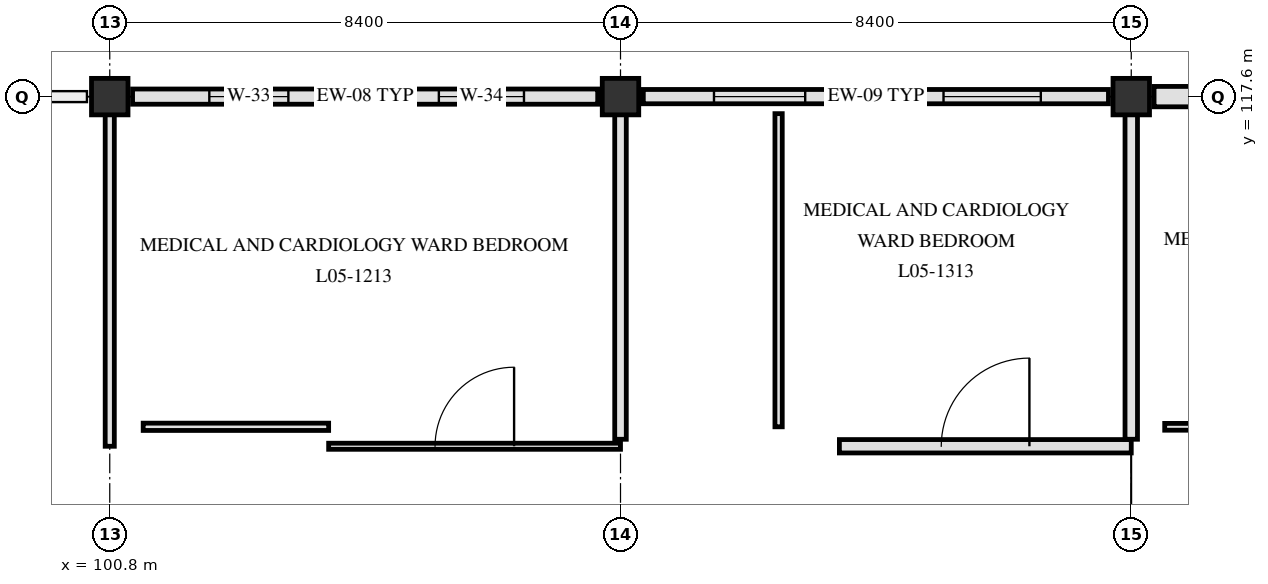
"""IFC4 building model, lengths in metres.
Left out: names, types, materials, properties, quantities, classifications, styles, units other than length and angle.
Written with IfcOpenShell. Run it as: python <this file> out.ifc"""

import sys

from ifc_helpers import new_model, si_unit, direction, frame, frame_2d, origin, origin_2d, place, context, subcontext, project, spatial, rectangle, extrude, element, fill, save


model = new_model("IFC4")
c1 = context("Model", 3, precision=1e-05, world=origin(), true_north=direction((0.0, 1.0)))
c2 = subcontext(c1, "Body", "Model", "MODEL_VIEW")
j1 = project(units=[si_unit("LENGTHUNIT", "METRE"), si_unit("PLANEANGLEUNIT", "RADIAN")], contexts=[c1])
p1 = place(None, origin())
s1 = spatial("IfcSite", under=j1, at=p1, CompositionType="ELEMENT")
p2 = place(p1, origin())
s2 = spatial("IfcBuilding", under=s1, at=p2, CompositionType="ELEMENT")
p3 = place(p2, frame((0.0, 0.0, 22.5)))
s3 = spatial("IfcBuildingStorey", under=s2, at=p3, CompositionType="ELEMENT", Elevation=22.5)
for number, where, z_axis, x_axis in (
    (1, (100.8, 117.6, 0.0), (0.0, 0.0, 1.0), (1.0, 0.0, 0.0)),
    (2, (109.2, 117.6, 0.0), (0.0, 0.0, 1.0), (1.0, 0.0, 0.0)),
    (3, (117.6, 117.6, 0.0), (0.0, 0.0, 1.0), (1.0, 0.0, 0.0)),
):
    element("IfcColumn", number, at=place(p3, frame(where, z_axis=z_axis, x_axis=x_axis)), inside=s3, PredefinedType="COLUMN", context=c2, shape_type="SweptSolid", body=[
        extrude(rectangle(XDim=0.6, YDim=0.6, at=origin_2d()), origin(), (0.0, 0.0, 1.0), 3.9),
    ])
p4 = place(p3, frame((101.175, 117.6, 0.0), z_axis=(0.0, 0.0, 1.0), x_axis=(1.0, 0.0, 0.0)))
e4 = element("IfcWall", 4, at=p4, inside=s3, PredefinedType="SOLIDWALL", context=c2, shape_type="SweptSolid", body=[
    extrude(rectangle(XDim=7.65, YDim=0.25, at=frame_2d((3.825, 0.0))), origin(), (0.0, 0.0, 1.0), 3.31),
])
p5 = place(p4, frame((1.262, 0.0, 0.85)))
e5 = element("IfcOpeningElement", 5, at=p5, cuts=e4, PredefinedType="OPENING", context=c2, shape_type="SweptSolid", body=[
    extrude(rectangle(XDim=1.3, YDim=1.66, at=frame_2d((0.65, 0.83))), frame((0.0, 0.135, 0.0), z_axis=(0.0, -1.0, 0.0), x_axis=(1.0, 0.0, 0.0)), (0.0, 0.0, 1.0), 0.27),
])
p6 = place(p4, frame((5.038, 0.0, 0.85)))
e6 = element("IfcOpeningElement", 6, at=p6, cuts=e4, PredefinedType="OPENING", context=c2, shape_type="SweptSolid", body=[
    extrude(rectangle(XDim=1.4, YDim=1.66, at=frame_2d((0.7, 0.83))), frame((0.0, 0.135, 0.0), z_axis=(0.0, -1.0, 0.0), x_axis=(1.0, 0.0, 0.0)), (0.0, 0.0, 1.0), 0.27),
])
p7 = place(p3, frame((109.575, 117.6, 0.0), z_axis=(0.0, 0.0, 1.0), x_axis=(1.0, 0.0, 0.0)))
e7 = element("IfcWall", 7, at=p7, inside=s3, PredefinedType="SOLIDWALL", context=c2, shape_type="SweptSolid", body=[
    extrude(rectangle(XDim=7.65, YDim=0.235, at=frame_2d((3.825, 0.0))), origin(), (0.0, 0.0, 1.0), 3.31),
])
p8 = place(p7, frame((1.163, 0.0, 0.85)))
e8 = element("IfcOpeningElement", 8, at=p8, cuts=e7, PredefinedType="OPENING", context=c2, shape_type="SweptSolid", body=[
    extrude(rectangle(XDim=1.5, YDim=1.66, at=frame_2d((0.75, 0.83))), frame((0.0, 0.127, 0.0), z_axis=(0.0, -1.0, 0.0), x_axis=(1.0, 0.0, 0.0)), (0.0, 0.0, 1.0), 0.255),
])
p9 = place(p7, frame((4.938, 0.0, 0.85)))
e9 = element("IfcOpeningElement", 9, at=p9, cuts=e7, PredefinedType="OPENING", context=c2, shape_type="SweptSolid", body=[
    extrude(rectangle(XDim=1.6, YDim=1.66, at=frame_2d((0.8, 0.83))), frame((0.0, 0.127, 0.0), z_axis=(0.0, -1.0, 0.0), x_axis=(1.0, 0.0, 0.0)), (0.0, 0.0, 1.0), 0.255),
])
p10 = place(p3, frame((117.975, 117.6, 0.0), z_axis=(0.0, 0.0, 1.0), x_axis=(1.0, 0.0, 0.0)))
e10 = element("IfcWall", 10, at=p10, inside=s3, PredefinedType="SOLIDWALL", context=c2, shape_type="SweptSolid", body=[
    extrude(rectangle(XDim=7.65, YDim=0.335, at=frame_2d((3.825, 0.0))), origin(), (0.0, 0.0, 1.0), 3.31),
])
p11 = place(p10, frame((1.062, 0.0, 0.85)))
e11 = element("IfcOpeningElement", 11, at=p11, cuts=e10, PredefinedType="OPENING", context=c2, shape_type="SweptSolid", body=[
    extrude(rectangle(XDim=1.7, YDim=1.66, at=frame_2d((0.85, 0.83))), frame((0.0, 0.177, 0.0), z_axis=(0.0, -1.0, 0.0), x_axis=(1.0, 0.0, 0.0)), (0.0, 0.0, 1.0), 0.355),
])
p12 = place(p10, frame((4.837, 0.0, 0.85)))
e12 = element("IfcOpeningElement", 12, at=p12, cuts=e10, PredefinedType="OPENING", context=c2, shape_type="SweptSolid", body=[
    extrude(rectangle(XDim=1.8, YDim=1.66, at=frame_2d((0.9, 0.83))), frame((0.0, 0.177, 0.0), z_axis=(0.0, -1.0, 0.0), x_axis=(1.0, 0.0, 0.0)), (0.0, 0.0, 1.0), 0.355),
])
p13 = place(p3, frame((104.4, 111.85, 0.0), z_axis=(0.0, 0.0, 1.0), x_axis=(1.0, 0.0, 0.0)))
e13 = element("IfcWall", 13, at=p13, inside=s3, PredefinedType="PARTITIONING", context=c2, shape_type="SweptSolid", body=[
    extrude(rectangle(XDim=4.8, YDim=0.1, at=frame_2d((2.4, 0.0))), origin(), (0.0, 0.0, 1.0), 3.3),
])
p14 = place(p13, frame((1.75, 0.0, 0.0)))
e14 = element("IfcOpeningElement", 14, at=p14, cuts=e13, PredefinedType="OPENING", context=c2, shape_type="SweptSolid", body=[
    extrude(rectangle(XDim=1.3, YDim=2.2, at=frame_2d((0.65, 1.1))), frame((0.0, 0.06, 0.0), z_axis=(0.0, -1.0, 0.0), x_axis=(1.0, 0.0, 0.0)), (0.0, 0.0, 1.0), 0.12),
])
p15 = place(p3, frame((112.8, 111.85, 0.0), z_axis=(0.0, 0.0, 1.0), x_axis=(1.0, 0.0, 0.0)))
e15 = element("IfcWall", 15, at=p15, inside=s3, PredefinedType="PARTITIONING", context=c2, shape_type="SweptSolid", body=[
    extrude(rectangle(XDim=4.8, YDim=0.22, at=frame_2d((2.4, 0.0))), origin(), (0.0, 0.0, 1.0), 3.3),
])
p16 = place(p15, frame((1.675, 0.0, 0.0)))
e16 = element("IfcOpeningElement", 16, at=p16, cuts=e15, PredefinedType="OPENING", context=c2, shape_type="SweptSolid", body=[
    extrude(rectangle(XDim=1.45, YDim=2.2, at=frame_2d((0.725, 1.1))), frame((0.0, 0.12, 0.0), z_axis=(0.0, -1.0, 0.0), x_axis=(1.0, 0.0, 0.0)), (0.0, 0.0, 1.0), 0.24),
])
p17 = place(p3, frame((101.35, 112.17, 0.0), z_axis=(0.0, 0.0, 1.0), x_axis=(1.0, 0.0, 0.0)))
e17 = element("IfcWall", 17, at=p17, inside=s3, PredefinedType="PARTITIONING", context=c2, shape_type="SweptSolid", body=[
    extrude(rectangle(XDim=3.05, YDim=0.12, at=frame_2d((1.525, 0.0))), origin(), (0.0, 0.0, 1.0), 3.61),
])
p18 = place(p3, frame((118.15, 112.17, 0.0), z_axis=(0.0, 0.0, 1.0), x_axis=(1.0, 0.0, 0.0)))
e18 = element("IfcWall", 18, at=p18, inside=s3, PredefinedType="PARTITIONING", context=c2, shape_type="SweptSolid", body=[
    extrude(rectangle(XDim=3.05, YDim=0.112, at=frame_2d((1.525, 0.0))), origin(), (0.0, 0.0, 1.0), 3.61),
])
p19 = place(p3, frame((100.8, 111.85, 0.0), z_axis=(0.0, 0.0, 1.0), x_axis=(0.0, 1.0, 0.0)))
e19 = element("IfcWall", 19, at=p19, inside=s3, PredefinedType="PARTITIONING", context=c2, shape_type="SweptSolid", body=[
    extrude(rectangle(XDim=5.455, YDim=0.15, at=frame_2d((2.728, 0.0))), origin(), (0.0, 0.0, 1.0), 3.3),
])
p20 = place(p3, frame((109.2, 111.965, 0.0), z_axis=(0.0, 0.0, 1.0), x_axis=(0.0, 1.0, 0.0)))
e20 = element("IfcWall", 20, at=p20, inside=s3, PredefinedType="PARTITIONING", context=c2, shape_type="SweptSolid", body=[
    extrude(rectangle(XDim=5.34, YDim=0.19, at=frame_2d((2.67, 0.0))), origin(), (0.0, 0.0, 1.0), 3.3),
])
p21 = place(p3, frame((111.8, 112.17, 0.0), z_axis=(0.0, 0.0, 1.0), x_axis=(0.0, 1.0, 0.0)))
e21 = element("IfcWall", 21, at=p21, inside=s3, PredefinedType="PARTITIONING", context=c2, shape_type="SweptSolid", body=[
    extrude(rectangle(XDim=5.15, YDim=0.12, at=frame_2d((2.575, 0.0))), origin(), (0.0, 0.0, 1.0), 3.34),
])
p22 = place(p3, frame((117.6, 111.965, 0.0), z_axis=(0.0, 0.0, 1.0), x_axis=(0.0, 1.0, 0.0)))
e22 = element("IfcWall", 22, at=p22, inside=s3, PredefinedType="PARTITIONING", context=c2, shape_type="SweptSolid", body=[
    extrude(rectangle(XDim=5.34, YDim=0.205, at=frame_2d((2.67, 0.0))), origin(), (0.0, 0.0, 1.0), 3.3),
])
p23 = place(p5, origin())
e23 = element("IfcWindow", 23, at=p23, inside=s3, PartitioningType="SINGLE_PANEL", PredefinedType="WINDOW", context=c2, shape_type="SweptSolid", body=[
    extrude(rectangle(XDim=1.3, YDim=1.66, at=frame_2d((0.65, 0.83))), frame((0.0, 0.03, 0.0), z_axis=(0.0, -1.0, 0.0), x_axis=(1.0, 0.0, 0.0)), (0.0, 0.0, 1.0), 0.06),
])
fill(e5, e23)
p24 = place(p6, origin())
e24 = element("IfcWindow", 24, at=p24, inside=s3, PartitioningType="SINGLE_PANEL", PredefinedType="WINDOW", context=c2, shape_type="SweptSolid", body=[
    extrude(rectangle(XDim=1.4, YDim=1.66, at=frame_2d((0.7, 0.83))), frame((0.0, 0.03, 0.0), z_axis=(0.0, -1.0, 0.0), x_axis=(1.0, 0.0, 0.0)), (0.0, 0.0, 1.0), 0.06),
])
fill(e6, e24)
p25 = place(p8, origin())
e25 = element("IfcWindow", 25, at=p25, inside=s3, PartitioningType="SINGLE_PANEL", PredefinedType="WINDOW", context=c2, shape_type="SweptSolid", body=[
    extrude(rectangle(XDim=1.5, YDim=1.66, at=frame_2d((0.75, 0.83))), frame((0.0, 0.03, 0.0), z_axis=(0.0, -1.0, 0.0), x_axis=(1.0, 0.0, 0.0)), (0.0, 0.0, 1.0), 0.06),
])
fill(e8, e25)
p26 = place(p9, origin())
e26 = element("IfcWindow", 26, at=p26, inside=s3, PartitioningType="SINGLE_PANEL", PredefinedType="WINDOW", context=c2, shape_type="SweptSolid", body=[
    extrude(rectangle(XDim=1.6, YDim=1.66, at=frame_2d((0.8, 0.83))), frame((0.0, 0.03, 0.0), z_axis=(0.0, -1.0, 0.0), x_axis=(1.0, 0.0, 0.0)), (0.0, 0.0, 1.0), 0.06),
])
fill(e9, e26)
p27 = place(p14, origin())
e27 = element("IfcDoor", 27, at=p27, inside=s3, OperationType="SINGLE_SWING_RIGHT", PredefinedType="DOOR", context=c2, shape_type="SweptSolid", body=[
    extrude(rectangle(XDim=1.3, YDim=2.2, at=frame_2d((0.65, 1.1))), frame((0.0, 0.025, 0.0), z_axis=(0.0, -1.0, 0.0), x_axis=(1.0, 0.0, 0.0)), (0.0, 0.0, 1.0), 0.05),
])
fill(e14, e27)
p28 = place(p16, origin())
e28 = element("IfcDoor", 28, at=p28, inside=s3, OperationType="SINGLE_SWING_RIGHT", PredefinedType="DOOR", context=c2, shape_type="SweptSolid", body=[
    extrude(rectangle(XDim=1.45, YDim=2.2, at=frame_2d((0.725, 1.1))), frame((0.0, 0.025, 0.0), z_axis=(0.0, -1.0, 0.0), x_axis=(1.0, 0.0, 0.0)), (0.0, 0.0, 1.0), 0.05),
])
fill(e16, e28)
save(model, sys.argv[1])
